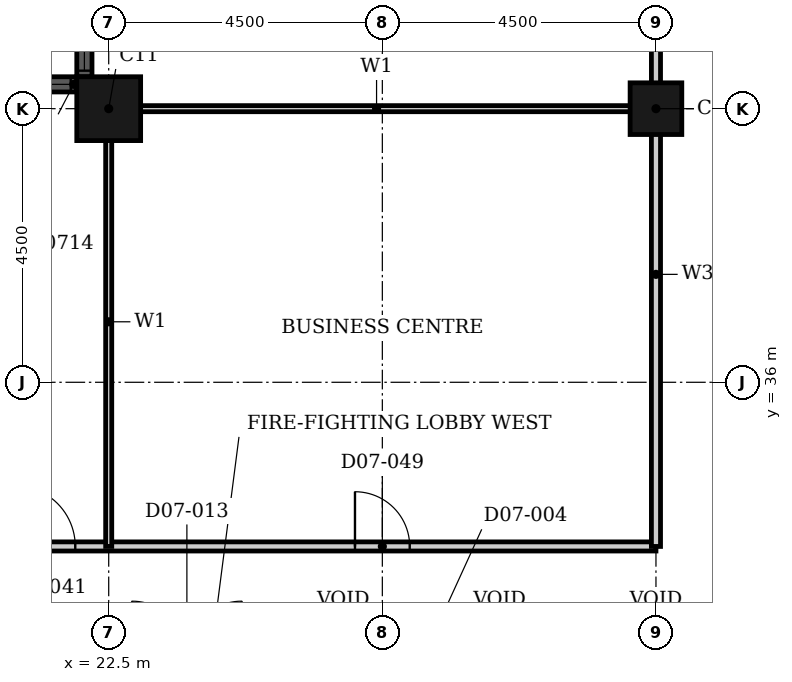
"""IFC4 building model, lengths in metres.
Left out: names, types, materials, properties, quantities, classifications, styles, units other than length and angle.
Written with IfcOpenShell. Run it as: python <this file> out.ifc"""

import sys

from ifc_helpers import new_model, si_unit, direction, frame, frame_2d, origin, origin_2d, place, context, subcontext, project, spatial, rectangle, hollow_rectangle, extrude, element, fill, save


model = new_model("IFC4")
c1 = context("Model", 3, precision=1e-05, world=origin(), true_north=direction((0.0, 1.0)))
c2 = subcontext(c1, "Body", "Model", "MODEL_VIEW")
j1 = project(units=[si_unit("LENGTHUNIT", "METRE"), si_unit("PLANEANGLEUNIT", "RADIAN")], contexts=[c1])
p1 = place(None, origin())
s1 = spatial("IfcSite", under=j1, at=p1, CompositionType="ELEMENT")
p2 = place(p1, origin())
s2 = spatial("IfcBuilding", under=s1, at=p2, CompositionType="ELEMENT")
p3 = place(p2, frame((0.0, 0.0, 37.2)))
s3 = spatial("IfcBuildingStorey", under=s2, at=p3, CompositionType="ELEMENT", Elevation=37.2)
p4 = place(p3, frame((22.5, 40.5, 0.0), z_axis=(0.0, 0.0, 1.0), x_axis=(1.0, 0.0, 0.0)))
e1 = element("IfcColumn", 1, at=p4, inside=s3, PredefinedType="COLUMN", context=c2, shape_type="SweptSolid", body=[
    extrude(hollow_rectangle(XDim=1.05, YDim=1.05, WallThickness=0.034, at=origin_2d()), origin(), (0.0, 0.0, 1.0), 3.6),
])
p5 = place(p3, frame((31.5, 40.5, 0.0), z_axis=(0.0, 0.0, 1.0), x_axis=(1.0, 0.0, 0.0)))
e2 = element("IfcColumn", 2, at=p5, inside=s3, PredefinedType="COLUMN", context=c2, shape_type="SweptSolid", body=[
    extrude(hollow_rectangle(XDim=0.85, YDim=0.85, WallThickness=0.026, at=origin_2d()), origin(), (0.0, 0.0, 1.0), 3.6),
])
p6 = place(p3, frame((22.1, 48.975, 0.0), z_axis=(0.0, 0.0, 1.0), x_axis=(0.0, -1.0, 0.0)))
e3 = element("IfcWall", 3, at=p6, inside=s3, PredefinedType="SOLIDWALL", context=c2, shape_type="SweptSolid", body=[
    extrude(rectangle(XDim=7.95, YDim=0.25, at=frame_2d((3.975, 0.0))), origin(), (0.0, 0.0, 1.0), 3.6),
])
p7 = place(p6, frame((0.1, 0.0, 0.9)))
e4 = element("IfcOpeningElement", 4, at=p7, cuts=e3, PredefinedType="OPENING", context=c2, shape_type="SweptSolid", body=[
    extrude(rectangle(XDim=3.25, YDim=2.08, at=frame_2d((1.625, 1.04))), frame((0.0, 0.135, 0.0), z_axis=(0.0, -1.0, 0.0), x_axis=(1.0, 0.0, 0.0)), (0.0, 0.0, 1.0), 0.27),
])
p8 = place(p6, frame((4.6, 0.0, 0.9)))
e5 = element("IfcOpeningElement", 5, at=p8, cuts=e3, PredefinedType="OPENING", context=c2, shape_type="SweptSolid", body=[
    extrude(rectangle(XDim=3.25, YDim=2.08, at=frame_2d((1.625, 1.04))), frame((0.0, 0.135, 0.0), z_axis=(0.0, -1.0, 0.0), x_axis=(1.0, 0.0, 0.0)), (0.0, 0.0, 1.0), 0.27),
])
p9 = place(p3, frame((21.975, 40.9, 0.0), z_axis=(0.0, 0.0, 1.0), x_axis=(-1.0, 0.0, 0.0)))
e6 = element("IfcWall", 6, at=p9, inside=s3, PredefinedType="SOLIDWALL", context=c2, shape_type="SweptSolid", body=[
    extrude(rectangle(XDim=3.45, YDim=0.25, at=frame_2d((1.725, 0.0))), origin(), (0.0, 0.0, 1.0), 3.6),
])
p10 = place(p9, frame((0.1, 0.0, 0.9)))
e7 = element("IfcOpeningElement", 7, at=p10, cuts=e6, PredefinedType="OPENING", context=c2, shape_type="SweptSolid", body=[
    extrude(rectangle(XDim=3.25, YDim=2.08, at=frame_2d((1.625, 1.04))), frame((0.0, 0.135, 0.0), z_axis=(0.0, -1.0, 0.0), x_axis=(1.0, 0.0, 0.0)), (0.0, 0.0, 1.0), 0.27),
])
p11 = place(p3, frame((16.2, 33.3, 0.0), z_axis=(0.0, 0.0, 1.0), x_axis=(1.0, 0.0, 0.0)))
e8 = element("IfcWall", 8, at=p11, inside=s3, PredefinedType="PARTITIONING", context=c2, shape_type="SweptSolid", body=[
    extrude(rectangle(XDim=15.3, YDim=0.15, at=frame_2d((7.65, 0.0))), origin(), (0.0, 0.0, 1.0), 3.3),
])
p12 = place(p11, frame((4.75, 0.0, 0.0)))
e9 = element("IfcOpeningElement", 9, at=p12, cuts=e8, PredefinedType="OPENING", context=c2, shape_type="SweptSolid", body=[
    extrude(rectangle(XDim=1.0, YDim=2.1, at=frame_2d((0.5, 1.05))), frame((0.0, 0.085, 0.0), z_axis=(0.0, -1.0, 0.0), x_axis=(1.0, 0.0, 0.0)), (0.0, 0.0, 1.0), 0.17),
])
p13 = place(p11, frame((10.35, 0.0, 0.0)))
e10 = element("IfcOpeningElement", 10, at=p13, cuts=e8, PredefinedType="OPENING", context=c2, shape_type="SweptSolid", body=[
    extrude(rectangle(XDim=0.9, YDim=2.1, at=frame_2d((0.45, 1.05))), frame((0.0, 0.085, 0.0), z_axis=(0.0, -1.0, 0.0), x_axis=(1.0, 0.0, 0.0)), (0.0, 0.0, 1.0), 0.17),
])
p14 = place(p3, frame((31.5, 33.3, 0.0), z_axis=(0.0, 0.0, 1.0), x_axis=(0.0, 1.0, 0.0)))
e11 = element("IfcWall", 11, at=p14, inside=s3, PredefinedType="PARTITIONING", context=c2, shape_type="SweptSolid", body=[
    extrude(rectangle(XDim=16.2, YDim=0.15, at=frame_2d((8.1, 0.0))), origin(), (0.0, 0.0, 1.0), 2.58),
])
p15 = place(p14, frame((8.95, 0.0, 0.0)))
e12 = element("IfcOpeningElement", 12, at=p15, cuts=e11, PredefinedType="OPENING", context=c2, shape_type="SweptSolid", body=[
    extrude(rectangle(XDim=1.0, YDim=2.1, at=frame_2d((0.5, 1.05))), frame((0.0, 0.085, 0.0), z_axis=(0.0, -1.0, 0.0), x_axis=(1.0, 0.0, 0.0)), (0.0, 0.0, 1.0), 0.17),
])
p16 = place(p3, frame((22.31, 40.5, 0.0), z_axis=(0.0, 0.0, 1.0), x_axis=(1.0, 0.0, 0.0)))
e13 = element("IfcWall", 13, at=p16, inside=s3, PredefinedType="PARTITIONING", context=c2, shape_type="SweptSolid", body=[
    extrude(rectangle(XDim=9.19, YDim=0.1, at=frame_2d((4.595, 0.0))), origin(), (0.0, 0.0, 1.0), 2.38),
])
p17 = place(p3, frame((22.5, 33.3, 0.0), z_axis=(0.0, 0.0, 1.0), x_axis=(0.0, 1.0, 0.0)))
e14 = element("IfcWall", 14, at=p17, inside=s3, PredefinedType="PARTITIONING", context=c2, shape_type="SweptSolid", body=[
    extrude(rectangle(XDim=7.39, YDim=0.1, at=frame_2d((3.695, 0.0))), origin(), (0.0, 0.0, 1.0), 3.3),
])
p18 = place(p8, origin())
e15 = element("IfcWindow", 15, at=p18, inside=s3, PartitioningType="SINGLE_PANEL", PredefinedType="WINDOW", context=c2, shape_type="SweptSolid", body=[
    extrude(rectangle(XDim=3.25, YDim=2.08, at=frame_2d((1.625, 1.04))), frame((0.0, 0.03, 0.0), z_axis=(0.0, -1.0, 0.0), x_axis=(1.0, 0.0, 0.0)), (0.0, 0.0, 1.0), 0.06),
])
fill(e5, e15)
p19 = place(p10, origin())
e16 = element("IfcWindow", 16, at=p19, inside=s3, PartitioningType="SINGLE_PANEL", PredefinedType="WINDOW", context=c2, shape_type="SweptSolid", body=[
    extrude(rectangle(XDim=3.25, YDim=2.08, at=frame_2d((1.625, 1.04))), frame((0.0, 0.03, 0.0), z_axis=(0.0, -1.0, 0.0), x_axis=(1.0, 0.0, 0.0)), (0.0, 0.0, 1.0), 0.06),
])
fill(e7, e16)
p20 = place(p12, origin())
e17 = element("IfcDoor", 17, at=p20, inside=s3, OperationType="SINGLE_SWING_RIGHT", PredefinedType="DOOR", context=c2, shape_type="SweptSolid", body=[
    extrude(rectangle(XDim=1.0, YDim=2.1, at=frame_2d((0.5, 1.05))), frame((0.0, 0.025, 0.0), z_axis=(0.0, -1.0, 0.0), x_axis=(1.0, 0.0, 0.0)), (0.0, 0.0, 1.0), 0.05),
])
fill(e9, e17)
p21 = place(p13, origin())
e18 = element("IfcDoor", 18, at=p21, inside=s3, OperationType="SINGLE_SWING_LEFT", PredefinedType="DOOR", context=c2, shape_type="SweptSolid", body=[
    extrude(rectangle(XDim=0.9, YDim=2.1, at=frame_2d((0.45, 1.05))), frame((0.0, 0.025, 0.0), z_axis=(0.0, -1.0, 0.0), x_axis=(1.0, 0.0, 0.0)), (0.0, 0.0, 1.0), 0.05),
])
fill(e10, e18)
save(model, sys.argv[1])
